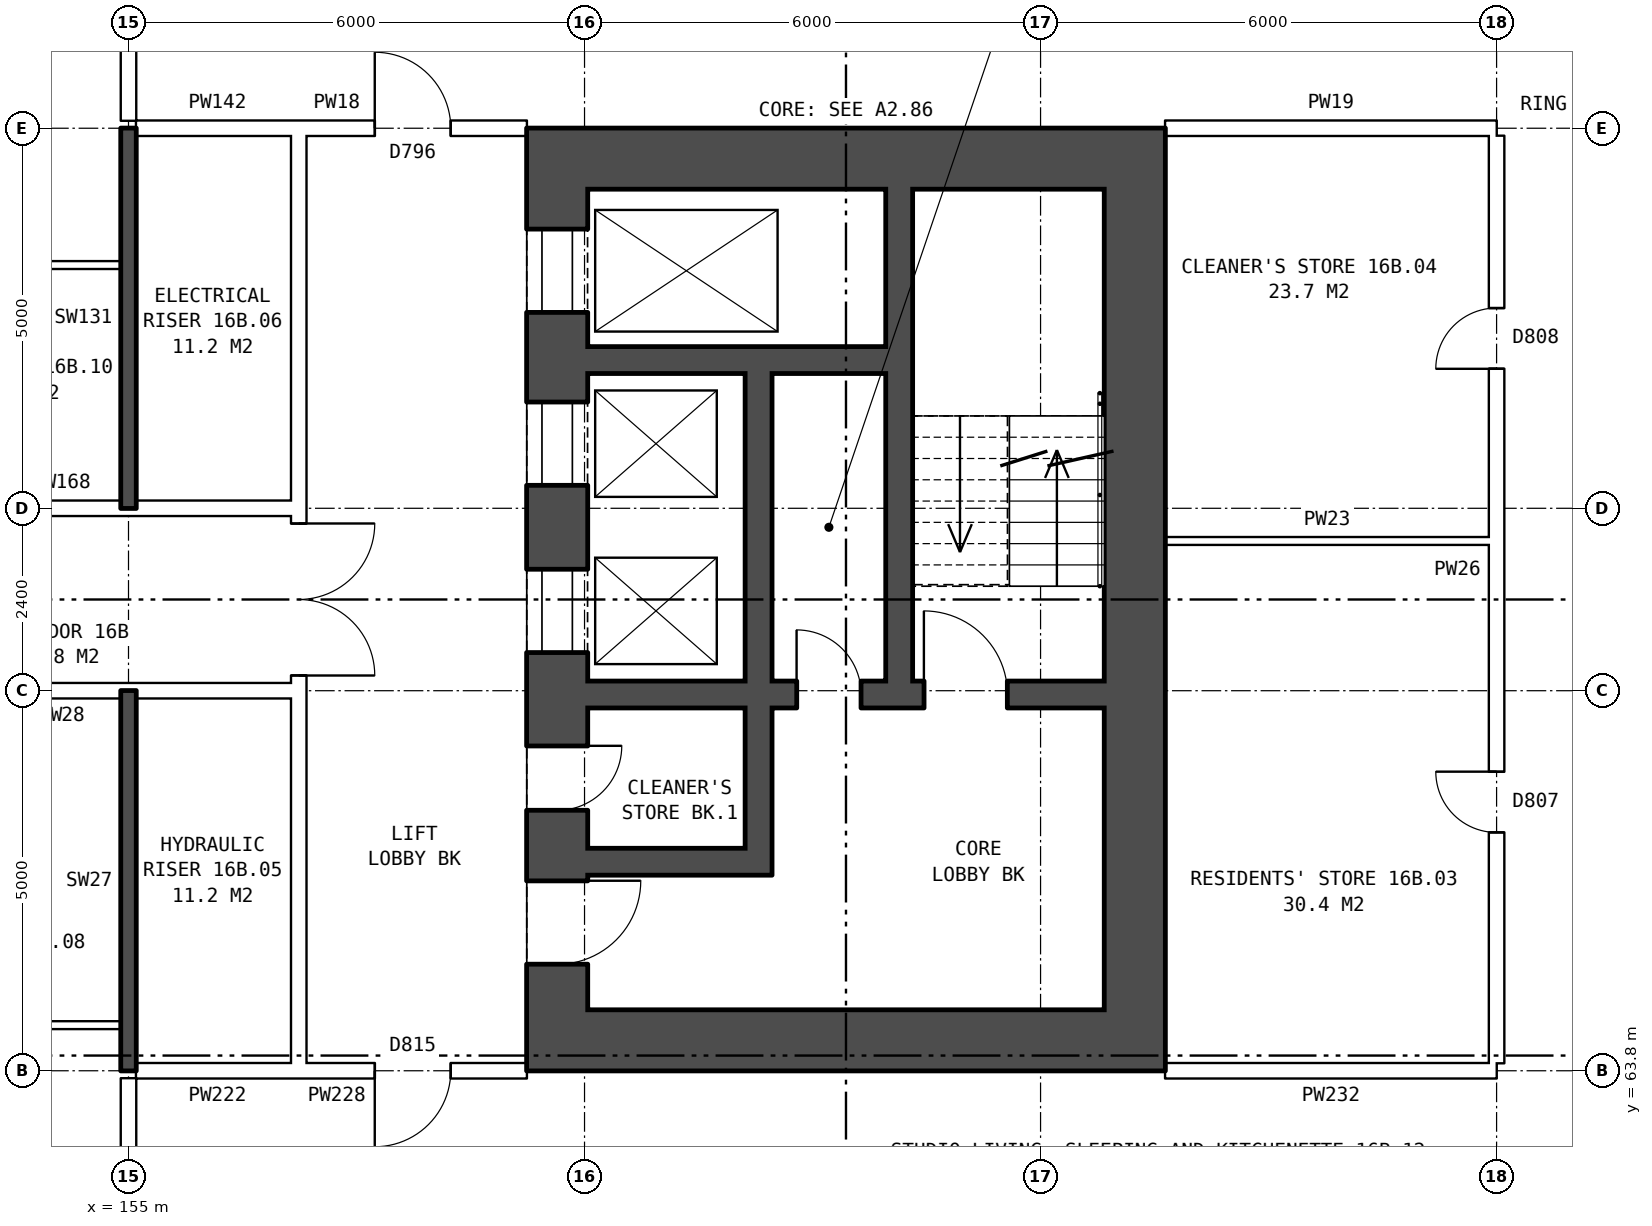
"""IFC4 building model, lengths in metres.
Left out: names, types, materials, properties, quantities, classifications, styles, units other than length and angle.
Written with IfcOpenShell. Run it as: python <this file> out.ifc"""

import sys

from ifc_helpers import new_model, si_unit, direction, frame, frame_2d, origin, place, context, subcontext, project, spatial, rectangle, extrude, element, fill, save


model = new_model("IFC4")
c1 = context("Model", 3, precision=1e-05, world=origin(), true_north=direction((0.0, 1.0)))
c2 = subcontext(c1, "Body", "Model", "MODEL_VIEW")
j1 = project(units=[si_unit("LENGTHUNIT", "METRE"), si_unit("PLANEANGLEUNIT", "RADIAN")], contexts=[c1])
p1 = place(None, origin())
s1 = spatial("IfcSite", under=j1, at=p1, CompositionType="ELEMENT")
p2 = place(p1, origin())
s2 = spatial("IfcBuilding", under=s1, at=p2, CompositionType="ELEMENT")
p3 = place(p2, frame((0.0, 0.0, 59.8)))
s3 = spatial("IfcBuildingStorey", under=s2, at=p3, CompositionType="ELEMENT", Elevation=59.8)
p4 = place(p3, frame((160.64, 75.4, 0.0), z_axis=(0.0, 0.0, 1.0), x_axis=(0.0, -1.0, 0.0)))
e1 = element("IfcWall", 1, at=p4, inside=s3, PredefinedType="SHEAR", context=c2, shape_type="SweptSolid", body=[
    extrude(rectangle(XDim=10.8, YDim=0.8, at=frame_2d((5.4, 0.0))), origin(), (0.0, 0.0, 1.0), 2.85),
])
p5 = place(p4, frame((0.525, 0.0, 0.0)))
e2 = element("IfcOpeningElement", 2, at=p5, cuts=e1, PredefinedType="OPENING", context=c2, shape_type="SweptSolid", body=[
    extrude(rectangle(XDim=1.1, YDim=2.1, at=frame_2d((0.55, 1.05))), frame((0.0, 0.41, 0.0), z_axis=(0.0, -1.0, 0.0), x_axis=(1.0, 0.0, 0.0)), (0.0, 0.0, 1.0), 0.82),
])
p6 = place(p4, frame((2.8, 0.0, 0.0)))
e3 = element("IfcOpeningElement", 3, at=p6, cuts=e1, PredefinedType="OPENING", context=c2, shape_type="SweptSolid", body=[
    extrude(rectangle(XDim=1.1, YDim=2.1, at=frame_2d((0.55, 1.05))), frame((0.0, 0.41, 0.0), z_axis=(0.0, -1.0, 0.0), x_axis=(1.0, 0.0, 0.0)), (0.0, 0.0, 1.0), 0.82),
])
p7 = place(p4, frame((5.0, 0.0, 0.0)))
e4 = element("IfcOpeningElement", 4, at=p7, cuts=e1, PredefinedType="OPENING", context=c2, shape_type="SweptSolid", body=[
    extrude(rectangle(XDim=1.1, YDim=2.1, at=frame_2d((0.55, 1.05))), frame((0.0, 0.41, 0.0), z_axis=(0.0, -1.0, 0.0), x_axis=(1.0, 0.0, 0.0)), (0.0, 0.0, 1.0), 0.82),
])
p8 = place(p4, frame((9.1, 0.0, 0.0)))
e5 = element("IfcOpeningElement", 5, at=p8, cuts=e1, PredefinedType="OPENING", context=c2, shape_type="SweptSolid", body=[
    extrude(rectangle(XDim=1.1, YDim=2.1, at=frame_2d((0.55, 1.05))), frame((0.0, 0.41, 0.0), z_axis=(0.0, -1.0, 0.0), x_axis=(1.0, 0.0, 0.0)), (0.0, 0.0, 1.0), 0.82),
])
p9 = place(p4, frame((7.325, 0.0, 0.0)))
e6 = element("IfcOpeningElement", 6, at=p9, cuts=e1, PredefinedType="OPENING", context=c2, shape_type="SweptSolid", body=[
    extrude(rectangle(XDim=0.85, YDim=2.1, at=frame_2d((0.425, 1.05))), frame((0.0, 0.41, 0.0), z_axis=(0.0, -1.0, 0.0), x_axis=(1.0, 0.0, 0.0)), (0.0, 0.0, 1.0), 0.82),
])
p10 = place(p3, frame((168.24, 75.4, 0.0), z_axis=(0.0, 0.0, 1.0), x_axis=(0.0, -1.0, 0.0)))
e7 = element("IfcWall", 7, at=p10, inside=s3, PredefinedType="SHEAR", context=c2, shape_type="SweptSolid", body=[
    extrude(rectangle(XDim=10.8, YDim=0.8, at=frame_2d((5.4, 0.0))), origin(), (0.0, 0.0, 1.0), 2.85),
])
for number, where, z_axis, x_axis in (
    (8, (160.24, 75.8, 0.0), (0.0, 0.0, 1.0), (1.0, 0.0, 0.0)),
    (9, (160.24, 64.2, 0.0), (0.0, 0.0, 1.0), (1.0, 0.0, 0.0)),
):
    element("IfcWall", number, at=place(p3, frame(where, z_axis=z_axis, x_axis=x_axis)), inside=s3, PredefinedType="SHEAR", context=c2, shape_type="SweptSolid", body=[
        extrude(rectangle(XDim=8.4, YDim=0.8, at=frame_2d((4.2, 0.0))), origin(), (0.0, 0.0, 1.0), 2.85),
    ])
p11 = place(p3, frame((161.04, 73.15, 0.0), z_axis=(0.0, 0.0, 1.0), x_axis=(1.0, 0.0, 0.0)))
e10 = element("IfcWall", 10, at=p11, inside=s3, PredefinedType="SHEAR", context=c2, shape_type="SweptSolid", body=[
    extrude(rectangle(XDim=3.925, YDim=0.35, at=frame_2d((1.962, 0.0))), origin(), (0.0, 0.0, 1.0), 2.85),
])
p12 = place(p3, frame((161.04, 68.75, 0.0), z_axis=(0.0, 0.0, 1.0), x_axis=(1.0, 0.0, 0.0)))
e11 = element("IfcWall", 11, at=p12, inside=s3, PredefinedType="SHEAR", context=c2, shape_type="SweptSolid", body=[
    extrude(rectangle(XDim=6.8, YDim=0.35, at=frame_2d((3.4, 0.0))), origin(), (0.0, 0.0, 1.0), 2.85),
])
p13 = place(p12, frame((4.425, 0.0, 0.0)))
e12 = element("IfcOpeningElement", 12, at=p13, cuts=e11, PredefinedType="OPENING", context=c2, shape_type="SweptSolid", body=[
    extrude(rectangle(XDim=1.1, YDim=2.1, at=frame_2d((0.55, 1.05))), frame((0.0, 0.185, 0.0), z_axis=(0.0, -1.0, 0.0), x_axis=(1.0, 0.0, 0.0)), (0.0, 0.0, 1.0), 0.37),
])
p14 = place(p12, frame((2.75, 0.0, 0.0)))
e13 = element("IfcOpeningElement", 13, at=p14, cuts=e11, PredefinedType="OPENING", context=c2, shape_type="SweptSolid", body=[
    extrude(rectangle(XDim=0.85, YDim=2.1, at=frame_2d((0.425, 1.05))), frame((0.0, 0.185, 0.0), z_axis=(0.0, -1.0, 0.0), x_axis=(1.0, 0.0, 0.0)), (0.0, 0.0, 1.0), 0.37),
])
p15 = place(p3, frame((161.04, 66.55, 0.0), z_axis=(0.0, 0.0, 1.0), x_axis=(1.0, 0.0, 0.0)))
e14 = element("IfcWall", 14, at=p15, inside=s3, PredefinedType="SHEAR", context=c2, shape_type="SweptSolid", body=[
    extrude(rectangle(XDim=2.075, YDim=0.35, at=frame_2d((1.038, 0.0))), origin(), (0.0, 0.0, 1.0), 2.85),
])
p16 = place(p3, frame((163.29, 72.975, 0.0), z_axis=(0.0, 0.0, 1.0), x_axis=(0.0, -1.0, 0.0)))
e15 = element("IfcWall", 15, at=p16, inside=s3, PredefinedType="SHEAR", context=c2, shape_type="SweptSolid", body=[
    extrude(rectangle(XDim=4.05, YDim=0.35, at=frame_2d((2.025, 0.0))), origin(), (0.0, 0.0, 1.0), 2.85),
])
p17 = place(p3, frame((163.29, 68.575, 0.0), z_axis=(0.0, 0.0, 1.0), x_axis=(0.0, -1.0, 0.0)))
e16 = element("IfcWall", 16, at=p17, inside=s3, PredefinedType="SHEAR", context=c2, shape_type="SweptSolid", body=[
    extrude(rectangle(XDim=2.2, YDim=0.35, at=frame_2d((1.1, 0.0))), origin(), (0.0, 0.0, 1.0), 2.85),
])
p18 = place(p3, frame((165.14, 75.4, 0.0), z_axis=(0.0, 0.0, 1.0), x_axis=(0.0, -1.0, 0.0)))
e17 = element("IfcWall", 17, at=p18, inside=s3, PredefinedType="SHEAR", context=c2, shape_type="SweptSolid", body=[
    extrude(rectangle(XDim=6.475, YDim=0.35, at=frame_2d((3.237, 0.0))), origin(), (0.0, 0.0, 1.0), 2.85),
])
p19 = place(p3, frame((157.24, 63.9, 0.0), z_axis=(0.0, 0.0, 1.0), x_axis=(0.0, 1.0, 0.0)))
e18 = element("IfcWall", 18, at=p19, inside=s3, PredefinedType="PARTITIONING", context=c2, shape_type="SweptSolid", body=[
    extrude(rectangle(XDim=12.2, YDim=0.2, at=frame_2d((6.1, 0.0))), origin(), (0.0, 0.0, 1.0), 2.85),
])
p20 = place(p19, frame((5.1, 0.0, 0.0)))
e19 = element("IfcOpeningElement", 19, at=p20, cuts=e18, PredefinedType="OPENING", context=c2, shape_type="SweptSolid", body=[
    extrude(rectangle(XDim=2.0, YDim=2.1, at=frame_2d((1.0, 1.05))), frame((0.0, 0.11, 0.0), z_axis=(0.0, -1.0, 0.0), x_axis=(1.0, 0.0, 0.0)), (0.0, 0.0, 1.0), 0.22),
])
p21 = place(p3, frame((155.1, 63.8, 0.0), z_axis=(0.0, 0.0, 1.0), x_axis=(1.0, 0.0, 0.0)))
e20 = element("IfcWall", 20, at=p21, inside=s3, PredefinedType="PARTITIONING", context=c2, shape_type="SweptSolid", body=[
    extrude(rectangle(XDim=2.14, YDim=0.2, at=frame_2d((1.07, 0.0))), origin(), (0.0, 0.0, 1.0), 2.85),
])
p22 = place(p3, frame((157.24, 63.8, 0.0), z_axis=(0.0, 0.0, 1.0), x_axis=(1.0, 0.0, 0.0)))
e21 = element("IfcWall", 21, at=p22, inside=s3, PredefinedType="PARTITIONING", context=c2, shape_type="SweptSolid", body=[
    extrude(rectangle(XDim=3.0, YDim=0.2, at=frame_2d((1.5, 0.0))), origin(), (0.0, 0.0, 1.0), 2.85),
])
p23 = place(p22, frame((1.0, 0.0, 0.0)))
e22 = element("IfcOpeningElement", 22, at=p23, cuts=e21, PredefinedType="OPENING", context=c2, shape_type="SweptSolid", body=[
    extrude(rectangle(XDim=1.0, YDim=2.1, at=frame_2d((0.5, 1.05))), frame((0.0, 0.11, 0.0), z_axis=(0.0, -1.0, 0.0), x_axis=(1.0, 0.0, 0.0)), (0.0, 0.0, 1.0), 0.22),
])
p24 = place(p3, frame((168.64, 63.8, 0.0), z_axis=(0.0, 0.0, 1.0), x_axis=(1.0, 0.0, 0.0)))
e23 = element("IfcWall", 23, at=p24, inside=s3, PredefinedType="PARTITIONING", context=c2, shape_type="SweptSolid", body=[
    extrude(rectangle(XDim=4.36, YDim=0.2, at=frame_2d((2.18, 0.0))), origin(), (0.0, 0.0, 1.0), 2.85),
])
p25 = place(p3, frame((152.0, 64.4, 0.0), z_axis=(0.0, 0.0, 1.0), x_axis=(1.0, 0.0, 0.0)))
e24 = element("IfcWall", 24, at=p25, inside=s3, PredefinedType="PARTITIONING", context=c2, shape_type="SweptSolid", body=[
    extrude(rectangle(XDim=2.9, YDim=0.1, at=frame_2d((1.45, 0.0))), origin(), (0.0, 0.0, 1.0), 2.85),
])
p26 = place(p3, frame((142.76, 68.8, 0.0), z_axis=(0.0, 0.0, 1.0), x_axis=(1.0, 0.0, 0.0)))
e25 = element("IfcWall", 25, at=p26, inside=s3, PredefinedType="PARTITIONING", context=c2, shape_type="SweptSolid", body=[
    extrude(rectangle(XDim=14.48, YDim=0.2, at=frame_2d((7.24, 0.0))), origin(), (0.0, 0.0, 1.0), 2.85),
])
p27 = place(p26, frame((4.24, 0.0, 0.0)))
e26 = element("IfcOpeningElement", 26, at=p27, cuts=e25, PredefinedType="OPENING", context=c2, shape_type="SweptSolid", body=[
    extrude(rectangle(XDim=1.0, YDim=2.1, at=frame_2d((0.5, 1.05))), frame((0.0, 0.11, 0.0), z_axis=(0.0, -1.0, 0.0), x_axis=(1.0, 0.0, 0.0)), (0.0, 0.0, 1.0), 0.22),
])
p28 = place(p26, frame((7.24, 0.0, 0.0)))
e27 = element("IfcOpeningElement", 27, at=p28, cuts=e25, PredefinedType="OPENING", context=c2, shape_type="SweptSolid", body=[
    extrude(rectangle(XDim=1.0, YDim=2.1, at=frame_2d((0.5, 1.05))), frame((0.0, 0.11, 0.0), z_axis=(0.0, -1.0, 0.0), x_axis=(1.0, 0.0, 0.0)), (0.0, 0.0, 1.0), 0.22),
])
p29 = place(p3, frame((168.64, 70.77, 0.0), z_axis=(0.0, 0.0, 1.0), x_axis=(1.0, 0.0, 0.0)))
e28 = element("IfcWall", 28, at=p29, inside=s3, PredefinedType="PARTITIONING", context=c2, shape_type="SweptSolid", body=[
    extrude(rectangle(XDim=4.26, YDim=0.1, at=frame_2d((2.13, 0.0))), origin(), (0.0, 0.0, 1.0), 2.85),
])
p30 = place(p3, frame((142.76, 71.2, 0.0), z_axis=(0.0, 0.0, 1.0), x_axis=(1.0, 0.0, 0.0)))
e29 = element("IfcWall", 29, at=p30, inside=s3, PredefinedType="PARTITIONING", context=c2, shape_type="SweptSolid", body=[
    extrude(rectangle(XDim=14.48, YDim=0.2, at=frame_2d((7.24, 0.0))), origin(), (0.0, 0.0, 1.0), 2.85),
])
p31 = place(p30, frame((4.24, 0.0, 0.0)))
e30 = element("IfcOpeningElement", 30, at=p31, cuts=e29, PredefinedType="OPENING", context=c2, shape_type="SweptSolid", body=[
    extrude(rectangle(XDim=1.0, YDim=2.1, at=frame_2d((0.5, 1.05))), frame((0.0, 0.11, 0.0), z_axis=(0.0, -1.0, 0.0), x_axis=(1.0, 0.0, 0.0)), (0.0, 0.0, 1.0), 0.22),
])
p32 = place(p30, frame((7.24, 0.0, 0.0)))
e31 = element("IfcOpeningElement", 31, at=p32, cuts=e29, PredefinedType="OPENING", context=c2, shape_type="SweptSolid", body=[
    extrude(rectangle(XDim=1.0, YDim=2.1, at=frame_2d((0.5, 1.05))), frame((0.0, 0.11, 0.0), z_axis=(0.0, -1.0, 0.0), x_axis=(1.0, 0.0, 0.0)), (0.0, 0.0, 1.0), 0.22),
])
p33 = place(p3, frame((152.0, 74.4, 0.0), z_axis=(0.0, 0.0, 1.0), x_axis=(1.0, 0.0, 0.0)))
e32 = element("IfcWall", 32, at=p33, inside=s3, PredefinedType="PARTITIONING", context=c2, shape_type="SweptSolid", body=[
    extrude(rectangle(XDim=2.9, YDim=0.1, at=frame_2d((1.45, 0.0))), origin(), (0.0, 0.0, 1.0), 2.85),
])
p34 = place(p3, frame((155.1, 76.2, 0.0), z_axis=(0.0, 0.0, 1.0), x_axis=(1.0, 0.0, 0.0)))
e33 = element("IfcWall", 33, at=p34, inside=s3, PredefinedType="PARTITIONING", context=c2, shape_type="SweptSolid", body=[
    extrude(rectangle(XDim=2.14, YDim=0.2, at=frame_2d((1.07, 0.0))), origin(), (0.0, 0.0, 1.0), 2.85),
])
p35 = place(p3, frame((157.24, 76.2, 0.0), z_axis=(0.0, 0.0, 1.0), x_axis=(1.0, 0.0, 0.0)))
e34 = element("IfcWall", 34, at=p35, inside=s3, PredefinedType="PARTITIONING", context=c2, shape_type="SweptSolid", body=[
    extrude(rectangle(XDim=3.0, YDim=0.2, at=frame_2d((1.5, 0.0))), origin(), (0.0, 0.0, 1.0), 2.85),
])
p36 = place(p35, frame((1.0, 0.0, 0.0)))
e35 = element("IfcOpeningElement", 35, at=p36, cuts=e34, PredefinedType="OPENING", context=c2, shape_type="SweptSolid", body=[
    extrude(rectangle(XDim=1.0, YDim=2.1, at=frame_2d((0.5, 1.05))), frame((0.0, 0.11, 0.0), z_axis=(0.0, -1.0, 0.0), x_axis=(1.0, 0.0, 0.0)), (0.0, 0.0, 1.0), 0.22),
])
p37 = place(p3, frame((168.64, 76.2, 0.0), z_axis=(0.0, 0.0, 1.0), x_axis=(1.0, 0.0, 0.0)))
e36 = element("IfcWall", 36, at=p37, inside=s3, PredefinedType="PARTITIONING", context=c2, shape_type="SweptSolid", body=[
    extrude(rectangle(XDim=4.36, YDim=0.2, at=frame_2d((2.18, 0.0))), origin(), (0.0, 0.0, 1.0), 2.85),
])
p38 = place(p3, frame((155.0, 61.5, 0.0), z_axis=(0.0, 0.0, 1.0), x_axis=(0.0, 1.0, 0.0)))
e37 = element("IfcWall", 37, at=p38, inside=s3, PredefinedType="PARTITIONING", context=c2, shape_type="SweptSolid", body=[
    extrude(rectangle(XDim=2.2, YDim=0.2, at=frame_2d((1.1, 0.0))), origin(), (0.0, 0.0, 1.0), 2.85),
])
for number, where, z_axis, x_axis in (
    (38, (155.0, 63.8, 0.0), (0.0, 0.0, 1.0), (0.0, 1.0, 0.0)),
    (39, (155.0, 71.2, 0.0), (0.0, 0.0, 1.0), (0.0, 1.0, 0.0)),
):
    element("IfcWall", number, at=place(p3, frame(where, z_axis=z_axis, x_axis=x_axis)), inside=s3, PredefinedType="SOLIDWALL", context=c2, shape_type="SweptSolid", body=[
        extrude(rectangle(XDim=5.0, YDim=0.2, at=frame_2d((2.5, 0.0))), origin(), (0.0, 0.0, 1.0), 2.85),
    ])
p39 = place(p3, frame((155.0, 76.3, 0.0), z_axis=(0.0, 0.0, 1.0), x_axis=(0.0, 1.0, 0.0)))
e40 = element("IfcWall", 40, at=p39, inside=s3, PredefinedType="PARTITIONING", context=c2, shape_type="SweptSolid", body=[
    extrude(rectangle(XDim=2.2, YDim=0.2, at=frame_2d((1.1, 0.0))), origin(), (0.0, 0.0, 1.0), 2.85),
])
p40 = place(p3, frame((173.0, 63.9, 0.0), z_axis=(0.0, 0.0, 1.0), x_axis=(0.0, 1.0, 0.0)))
e41 = element("IfcWall", 41, at=p40, inside=s3, PredefinedType="PARTITIONING", context=c2, shape_type="SweptSolid", body=[
    extrude(rectangle(XDim=12.2, YDim=0.2, at=frame_2d((6.1, 0.0))), origin(), (0.0, 0.0, 1.0), 2.85),
])
p41 = place(p40, frame((3.035, 0.0, 0.0)))
e42 = element("IfcOpeningElement", 42, at=p41, cuts=e41, PredefinedType="OPENING", context=c2, shape_type="SweptSolid", body=[
    extrude(rectangle(XDim=0.8, YDim=2.1, at=frame_2d((0.4, 1.05))), frame((0.0, 0.11, 0.0), z_axis=(0.0, -1.0, 0.0), x_axis=(1.0, 0.0, 0.0)), (0.0, 0.0, 1.0), 0.22),
])
p42 = place(p40, frame((9.135, 0.0, 0.0)))
e43 = element("IfcOpeningElement", 43, at=p42, cuts=e41, PredefinedType="OPENING", context=c2, shape_type="SweptSolid", body=[
    extrude(rectangle(XDim=0.8, YDim=2.1, at=frame_2d((0.4, 1.05))), frame((0.0, 0.11, 0.0), z_axis=(0.0, -1.0, 0.0), x_axis=(1.0, 0.0, 0.0)), (0.0, 0.0, 1.0), 0.22),
])
p43 = place(p5, origin())
e44 = element("IfcDoor", 44, at=p43, inside=s3, OperationType="DOUBLE_DOOR_SLIDING", PredefinedType="DOOR", context=c2, shape_type="SweptSolid", body=[
    extrude(rectangle(XDim=1.1, YDim=2.1, at=frame_2d((0.55, 1.05))), frame((0.0, 0.385, 0.0), z_axis=(0.0, -1.0, 0.0), x_axis=(1.0, 0.0, 0.0)), (0.0, 0.0, 1.0), 0.05),
])
fill(e2, e44)
p44 = place(p6, origin())
e45 = element("IfcDoor", 45, at=p44, inside=s3, OperationType="DOUBLE_DOOR_SLIDING", PredefinedType="DOOR", context=c2, shape_type="SweptSolid", body=[
    extrude(rectangle(XDim=1.1, YDim=2.1, at=frame_2d((0.55, 1.05))), frame((0.0, 0.385, 0.0), z_axis=(0.0, -1.0, 0.0), x_axis=(1.0, 0.0, 0.0)), (0.0, 0.0, 1.0), 0.05),
])
fill(e3, e45)
p45 = place(p7, origin())
e46 = element("IfcDoor", 46, at=p45, inside=s3, OperationType="DOUBLE_DOOR_SLIDING", PredefinedType="DOOR", context=c2, shape_type="SweptSolid", body=[
    extrude(rectangle(XDim=1.1, YDim=2.1, at=frame_2d((0.55, 1.05))), frame((0.0, 0.385, 0.0), z_axis=(0.0, -1.0, 0.0), x_axis=(1.0, 0.0, 0.0)), (0.0, 0.0, 1.0), 0.05),
])
fill(e4, e46)
p46 = place(p8, origin())
e47 = element("IfcDoor", 47, at=p46, inside=s3, OperationType="SINGLE_SWING_LEFT", PredefinedType="DOOR", context=c2, shape_type="SweptSolid", body=[
    extrude(rectangle(XDim=1.1, YDim=2.1, at=frame_2d((0.55, 1.05))), frame((0.0, 0.385, 0.0), z_axis=(0.0, -1.0, 0.0), x_axis=(1.0, 0.0, 0.0)), (0.0, 0.0, 1.0), 0.05),
])
fill(e5, e47)
p47 = place(p13, origin())
e48 = element("IfcDoor", 48, at=p47, inside=s3, OperationType="SINGLE_SWING_LEFT", PredefinedType="DOOR", context=c2, shape_type="SweptSolid", body=[
    extrude(rectangle(XDim=1.1, YDim=2.1, at=frame_2d((0.55, 1.05))), frame((0.0, 0.025, 0.0), z_axis=(0.0, -1.0, 0.0), x_axis=(1.0, 0.0, 0.0)), (0.0, 0.0, 1.0), 0.05),
])
fill(e12, e48)
p48 = place(p9, origin())
e49 = element("IfcDoor", 49, at=p48, inside=s3, OperationType="SINGLE_SWING_LEFT", PredefinedType="DOOR", context=c2, shape_type="SweptSolid", body=[
    extrude(rectangle(XDim=0.85, YDim=2.1, at=frame_2d((0.425, 1.05))), frame((0.0, 0.385, 0.0), z_axis=(0.0, -1.0, 0.0), x_axis=(1.0, 0.0, 0.0)), (0.0, 0.0, 1.0), 0.05),
])
fill(e6, e49)
p49 = place(p14, origin())
e50 = element("IfcDoor", 50, at=p49, inside=s3, OperationType="SINGLE_SWING_LEFT", PredefinedType="DOOR", context=c2, shape_type="SweptSolid", body=[
    extrude(rectangle(XDim=0.85, YDim=2.1, at=frame_2d((0.425, 1.05))), frame((0.0, 0.025, 0.0), z_axis=(0.0, -1.0, 0.0), x_axis=(1.0, 0.0, 0.0)), (0.0, 0.0, 1.0), 0.05),
])
fill(e13, e50)
p50 = place(p20, frame((2.0, 0.0, 0.0), z_axis=(0.0, 0.0, 1.0), x_axis=(-1.0, 0.0, 0.0)))
e51 = element("IfcDoor", 51, at=p50, inside=s3, OperationType="DOUBLE_DOOR_SINGLE_SWING", PredefinedType="DOOR", context=c2, shape_type="SweptSolid", body=[
    extrude(rectangle(XDim=2.0, YDim=2.1, at=frame_2d((1.0, 1.05))), frame((0.0, 0.025, 0.0), z_axis=(0.0, -1.0, 0.0), x_axis=(1.0, 0.0, 0.0)), (0.0, 0.0, 1.0), 0.05),
])
fill(e19, e51)
p51 = place(p23, frame((1.0, 0.0, 0.0), z_axis=(0.0, 0.0, 1.0), x_axis=(-1.0, 0.0, 0.0)))
e52 = element("IfcDoor", 52, at=p51, inside=s3, OperationType="SINGLE_SWING_RIGHT", PredefinedType="DOOR", context=c2, shape_type="SweptSolid", body=[
    extrude(rectangle(XDim=1.0, YDim=2.1, at=frame_2d((0.5, 1.05))), frame((0.0, 0.025, 0.0), z_axis=(0.0, -1.0, 0.0), x_axis=(1.0, 0.0, 0.0)), (0.0, 0.0, 1.0), 0.05),
])
fill(e22, e52)
p52 = place(p36, origin())
e53 = element("IfcDoor", 53, at=p52, inside=s3, OperationType="SINGLE_SWING_LEFT", PredefinedType="DOOR", context=c2, shape_type="SweptSolid", body=[
    extrude(rectangle(XDim=1.0, YDim=2.1, at=frame_2d((0.5, 1.05))), frame((0.0, 0.025, 0.0), z_axis=(0.0, -1.0, 0.0), x_axis=(1.0, 0.0, 0.0)), (0.0, 0.0, 1.0), 0.05),
])
fill(e35, e53)
p53 = place(p41, origin())
e54 = element("IfcDoor", 54, at=p53, inside=s3, OperationType="SINGLE_SWING_RIGHT", PredefinedType="DOOR", context=c2, shape_type="SweptSolid", body=[
    extrude(rectangle(XDim=0.8, YDim=2.1, at=frame_2d((0.4, 1.05))), frame((0.0, 0.025, 0.0), z_axis=(0.0, -1.0, 0.0), x_axis=(1.0, 0.0, 0.0)), (0.0, 0.0, 1.0), 0.05),
])
fill(e42, e54)
p54 = place(p42, origin())
e55 = element("IfcDoor", 55, at=p54, inside=s3, OperationType="SINGLE_SWING_LEFT", PredefinedType="DOOR", context=c2, shape_type="SweptSolid", body=[
    extrude(rectangle(XDim=0.8, YDim=2.1, at=frame_2d((0.4, 1.05))), frame((0.0, 0.025, 0.0), z_axis=(0.0, -1.0, 0.0), x_axis=(1.0, 0.0, 0.0)), (0.0, 0.0, 1.0), 0.05),
])
fill(e43, e55)
save(model, sys.argv[1])
